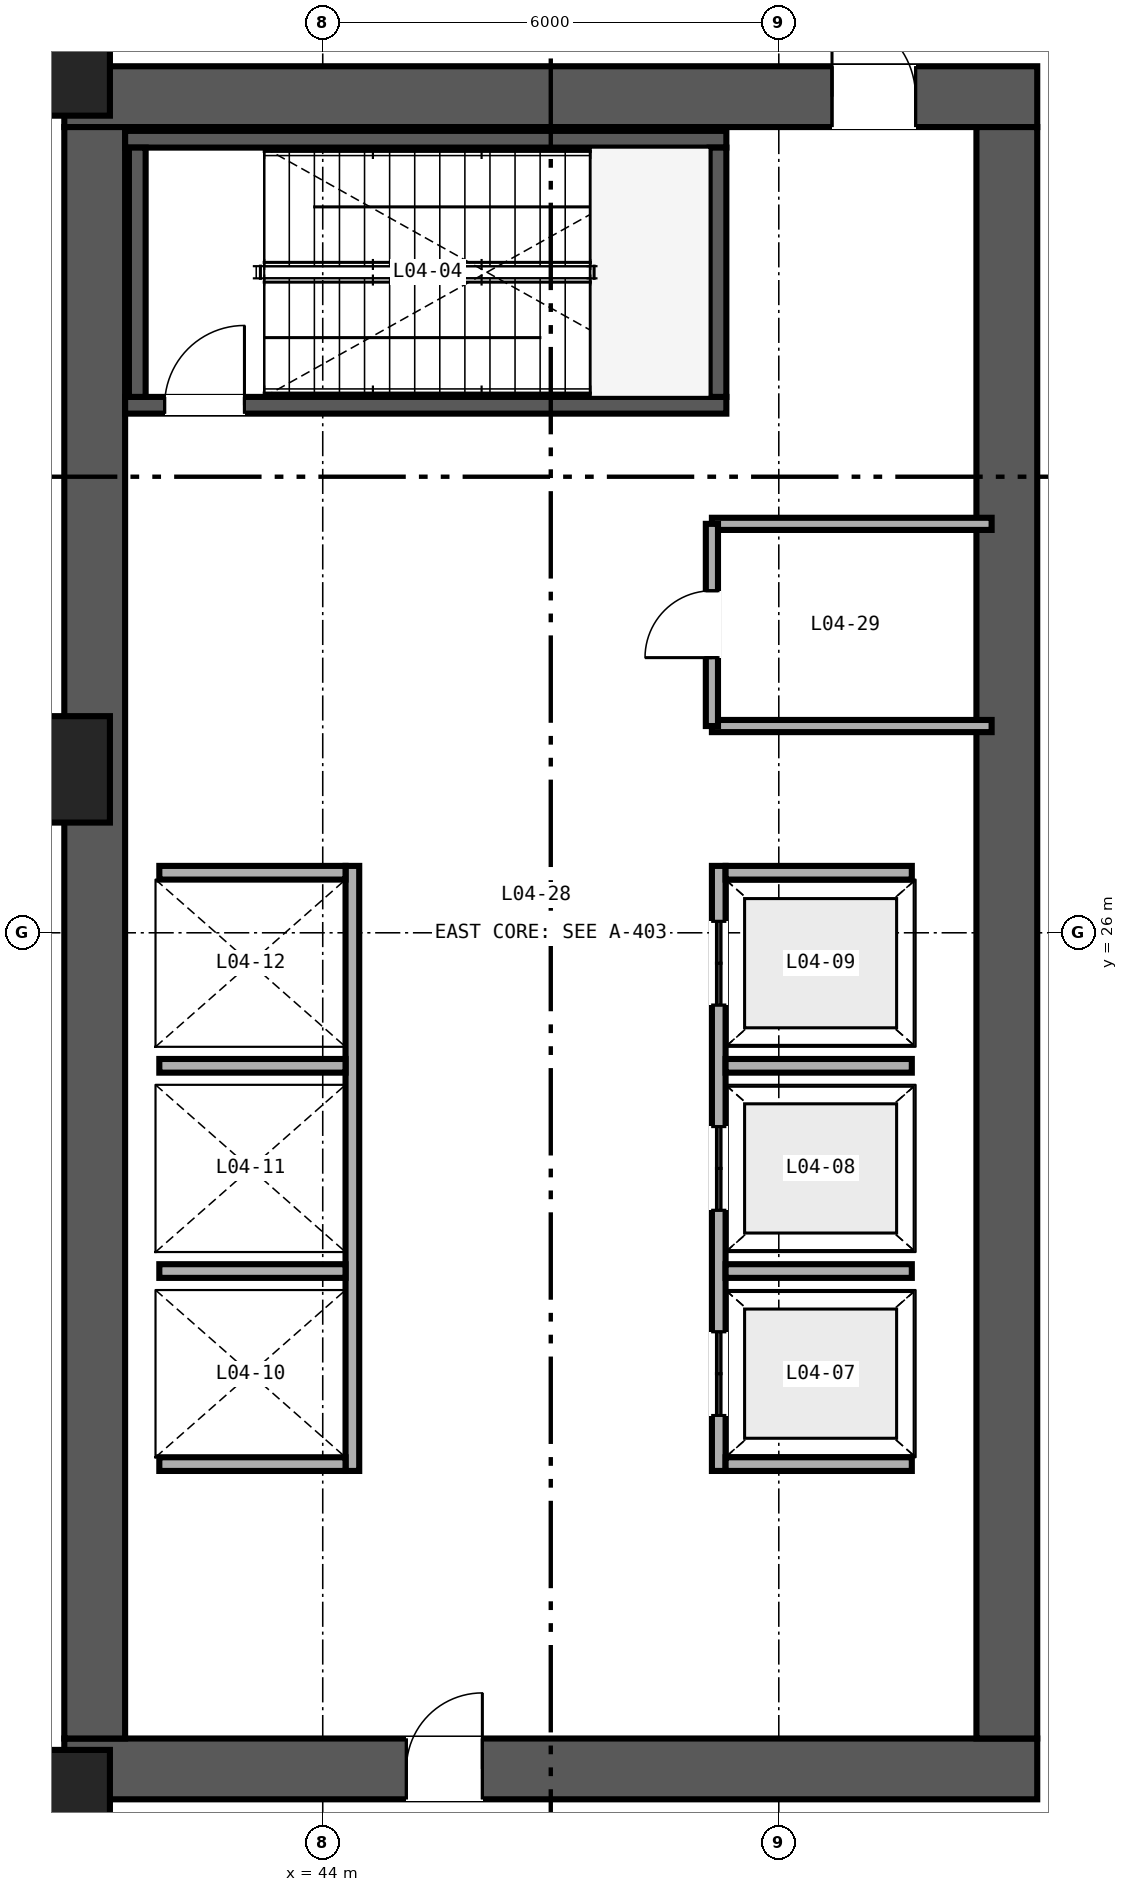
"""IFC4 building model, lengths in metres.
Left out: names, types, materials, properties, quantities, classifications, styles, units other than length and angle.
Written with IfcOpenShell. Run it as: python <this file> out.ifc"""

import sys

from ifc_helpers import new_model, si_unit, direction, frame, frame_2d, origin, origin_2d, place, context, subcontext, project, spatial, rectangle, extrude, source, transform, mapped, element, fill, save


model = new_model("IFC4")
c1 = context("Model", 3, precision=1e-05, world=origin(), true_north=direction((0.0, 1.0)))
c2 = subcontext(c1, "Body", "Model", "MODEL_VIEW")
j1 = project(units=[si_unit("LENGTHUNIT", "METRE"), si_unit("PLANEANGLEUNIT", "RADIAN")], contexts=[c1])
p1 = place(None, origin())
s1 = spatial("IfcSite", under=j1, at=p1, CompositionType="ELEMENT")
p2 = place(p1, origin())
s2 = spatial("IfcBuilding", under=s1, at=p2, CompositionType="ELEMENT")
p3 = place(p2, frame((0.0, 0.0, 19.2)))
s3 = spatial("IfcBuildingStorey", under=s2, at=p3, CompositionType="ELEMENT", Elevation=19.2)
p4 = place(p3, frame((40.6, 15.0, 0.0), z_axis=(0.0, 0.0, 1.0), x_axis=(1.0, 0.0, 0.0)))
e1 = element("IfcWall", 1, at=p4, inside=s3, PredefinedType="SHEAR", context=c2, shape_type="SweptSolid", body=[
    extrude(rectangle(XDim=12.8, YDim=0.8, at=frame_2d((6.4, 0.0))), origin(), (0.0, 0.0, 1.0), 4.48),
])
p5 = place(p4, frame((4.5, 0.0, 0.0)))
e2 = element("IfcOpeningElement", 2, at=p5, cuts=e1, PredefinedType="OPENING", context=c2, shape_type="SweptSolid", body=[
    extrude(rectangle(XDim=1.0, YDim=2.15, at=frame_2d((0.5, 1.075))), frame((0.0, 0.41, 0.0), z_axis=(0.0, -1.0, 0.0), x_axis=(1.0, 0.0, 0.0)), (0.0, 0.0, 1.0), 0.82),
])
p6 = place(p3, frame((40.6, 37.0, 0.0), z_axis=(0.0, 0.0, 1.0), x_axis=(1.0, 0.0, 0.0)))
e3 = element("IfcWall", 3, at=p6, inside=s3, PredefinedType="SHEAR", context=c2, shape_type="SweptSolid", body=[
    extrude(rectangle(XDim=12.8, YDim=0.8, at=frame_2d((6.4, 0.0))), origin(), (0.0, 0.0, 1.0), 4.48),
])
p7 = place(p6, frame((10.1, 0.0, 0.0)))
e4 = element("IfcOpeningElement", 4, at=p7, cuts=e3, PredefinedType="OPENING", context=c2, shape_type="SweptSolid", body=[
    extrude(rectangle(XDim=1.1, YDim=2.15, at=frame_2d((0.55, 1.075))), frame((0.0, 0.41, 0.0), z_axis=(0.0, -1.0, 0.0), x_axis=(1.0, 0.0, 0.0)), (0.0, 0.0, 1.0), 0.82),
])
for number, where, z_axis, x_axis in (
    (5, (41.0, 15.4, 0.0), (0.0, 0.0, 1.0), (0.0, 1.0, 0.0)),
    (6, (53.0, 15.4, 0.0), (0.0, 0.0, 1.0), (0.0, 1.0, 0.0)),
):
    element("IfcWall", number, at=place(p3, frame(where, z_axis=z_axis, x_axis=x_axis)), inside=s3, PredefinedType="SHEAR", context=c2, shape_type="SweptSolid", body=[
        extrude(rectangle(XDim=21.2, YDim=0.8, at=frame_2d((10.6, 0.0))), origin(), (0.0, 0.0, 1.0), 4.48),
    ])
p8 = place(p3, frame((41.4, 32.94, 0.0), z_axis=(0.0, 0.0, 1.0), x_axis=(1.0, 0.0, 0.0)))
e7 = element("IfcWall", 7, at=p8, inside=s3, PredefinedType="SHEAR", context=c2, shape_type="SweptSolid", body=[
    extrude(rectangle(XDim=7.91, YDim=0.22, at=frame_2d((3.955, 0.0))), origin(), (0.0, 0.0, 1.0), 4.6),
])
p9 = place(p8, frame((0.52, 0.0, 0.0)))
e8 = element("IfcOpeningElement", 8, at=p9, cuts=e7, PredefinedType="OPENING", context=c2, shape_type="SweptSolid", body=[
    extrude(rectangle(XDim=1.05, YDim=2.15, at=frame_2d((0.525, 1.075))), frame((0.0, 0.12, 0.0), z_axis=(0.0, -1.0, 0.0), x_axis=(1.0, 0.0, 0.0)), (0.0, 0.0, 1.0), 0.24),
])
p10 = place(p3, frame((41.4, 36.44, 0.0), z_axis=(0.0, 0.0, 1.0), x_axis=(1.0, 0.0, 0.0)))
e9 = element("IfcWall", 9, at=p10, inside=s3, PredefinedType="SHEAR", context=c2, shape_type="SweptSolid", body=[
    extrude(rectangle(XDim=7.91, YDim=0.22, at=frame_2d((3.955, 0.0))), origin(), (0.0, 0.0, 1.0), 4.6),
])
for number, where, z_axis, x_axis in (
    (10, (41.56, 33.05, 0.0), (0.0, 0.0, 1.0), (0.0, 1.0, 0.0)),
    (11, (49.2, 33.05, 0.0), (0.0, 0.0, 1.0), (0.0, 1.0, 0.0)),
):
    element("IfcWall", number, at=place(p3, frame(where, z_axis=z_axis, x_axis=x_axis)), inside=s3, PredefinedType="SHEAR", context=c2, shape_type="SweptSolid", body=[
        extrude(rectangle(XDim=3.28, YDim=0.22, at=frame_2d((1.64, 0.0))), origin(), (0.0, 0.0, 1.0), 4.6),
    ])
m1 = source(origin(), c2, "Body", "SweptSolid", [
    extrude(rectangle(XDim=1.4, YDim=1.4, at=origin_2d()), origin(), (0.0, 0.0, 1.0), 4.48),
])
for number, where, z_axis, x_axis in (
    (12, (40.5, 14.55, 0.0), (0.0, 0.0, 1.0), (1.0, 0.0, 0.0)),
    (13, (40.5, 28.15, 0.0), (0.0, 0.0, 1.0), (1.0, 0.0, 0.0)),
    (14, (40.5, 37.45, 0.0), (0.0, 0.0, 1.0), (1.0, 0.0, 0.0)),
):
    element("IfcColumn", number, at=place(p3, frame(where, z_axis=z_axis, x_axis=x_axis)), inside=s3, PredefinedType="COLUMN", context=c2, shape_type="MappedRepresentation", body=[
        mapped(m1, transform((0.0, 0.0, 0.0), scale=1.0)),
    ])
p11 = place(p3, frame((49.21, 18.92, 0.0), z_axis=(0.0, 0.0, 1.0), x_axis=(0.0, 1.0, 0.0)))
e15 = element("IfcWall", 15, at=p11, inside=s3, PredefinedType="SOLIDWALL", context=c2, shape_type="SweptSolid", body=[
    extrude(rectangle(XDim=7.96, YDim=0.18, at=frame_2d((3.98, 0.0))), origin(), (0.0, 0.0, 1.0), 4.48),
])
p12 = place(p11, frame((0.73, 0.0, 0.0)))
e16 = element("IfcOpeningElement", 16, at=p12, cuts=e15, PredefinedType="OPENING", context=c2, shape_type="SweptSolid", body=[
    extrude(rectangle(XDim=1.1, YDim=2.2, at=frame_2d((0.55, 1.1))), frame((0.0, 0.1, 0.0), z_axis=(0.0, -1.0, 0.0), x_axis=(1.0, 0.0, 0.0)), (0.0, 0.0, 1.0), 0.2),
])
p13 = place(p11, frame((3.43, 0.0, 0.0)))
e17 = element("IfcOpeningElement", 17, at=p13, cuts=e15, PredefinedType="OPENING", context=c2, shape_type="SweptSolid", body=[
    extrude(rectangle(XDim=1.1, YDim=2.2, at=frame_2d((0.55, 1.1))), frame((0.0, 0.1, 0.0), z_axis=(0.0, -1.0, 0.0), x_axis=(1.0, 0.0, 0.0)), (0.0, 0.0, 1.0), 0.2),
])
p14 = place(p11, frame((6.13, 0.0, 0.0)))
e18 = element("IfcOpeningElement", 18, at=p14, cuts=e15, PredefinedType="OPENING", context=c2, shape_type="SweptSolid", body=[
    extrude(rectangle(XDim=1.1, YDim=2.2, at=frame_2d((0.55, 1.1))), frame((0.0, 0.1, 0.0), z_axis=(0.0, -1.0, 0.0), x_axis=(1.0, 0.0, 0.0)), (0.0, 0.0, 1.0), 0.2),
])
for number, where, z_axis, x_axis in (
    (19, (49.3, 19.01, 0.0), (0.0, 0.0, 1.0), (1.0, 0.0, 0.0)),
    (20, (49.3, 26.79, 0.0), (0.0, 0.0, 1.0), (1.0, 0.0, 0.0)),
    (21, (49.3, 21.55, 0.0), (0.0, 0.0, 1.0), (1.0, 0.0, 0.0)),
    (22, (49.3, 24.25, 0.0), (0.0, 0.0, 1.0), (1.0, 0.0, 0.0)),
):
    element("IfcWall", number, at=place(p3, frame(where, z_axis=z_axis, x_axis=x_axis)), inside=s3, PredefinedType="SOLIDWALL", context=c2, shape_type="SweptSolid", body=[
        extrude(rectangle(XDim=2.45, YDim=0.18, at=frame_2d((1.225, 0.0))), origin(), (0.0, 0.0, 1.0), 4.48),
    ])
p15 = place(p3, frame((44.39, 18.92, 0.0), z_axis=(0.0, 0.0, 1.0), x_axis=(0.0, 1.0, 0.0)))
e23 = element("IfcWall", 23, at=p15, inside=s3, PredefinedType="SOLIDWALL", context=c2, shape_type="SweptSolid", body=[
    extrude(rectangle(XDim=7.96, YDim=0.18, at=frame_2d((3.98, 0.0))), origin(), (0.0, 0.0, 1.0), 4.48),
])
for number, where, z_axis, x_axis in (
    (24, (41.85, 19.01, 0.0), (0.0, 0.0, 1.0), (1.0, 0.0, 0.0)),
    (25, (41.85, 26.79, 0.0), (0.0, 0.0, 1.0), (1.0, 0.0, 0.0)),
    (26, (41.85, 21.55, 0.0), (0.0, 0.0, 1.0), (1.0, 0.0, 0.0)),
    (27, (41.85, 24.25, 0.0), (0.0, 0.0, 1.0), (1.0, 0.0, 0.0)),
):
    element("IfcWall", number, at=place(p3, frame(where, z_axis=z_axis, x_axis=x_axis)), inside=s3, PredefinedType="SOLIDWALL", context=c2, shape_type="SweptSolid", body=[
        extrude(rectangle(XDim=2.45, YDim=0.18, at=frame_2d((1.225, 0.0))), origin(), (0.0, 0.0, 1.0), 4.48),
    ])
p16 = place(p3, frame((49.12, 28.72, 0.0), z_axis=(0.0, 0.0, 1.0), x_axis=(1.0, 0.0, 0.0)))
e28 = element("IfcWall", 28, at=p16, inside=s3, PredefinedType="PARTITIONING", context=c2, shape_type="SweptSolid", body=[
    extrude(rectangle(XDim=3.68, YDim=0.16, at=frame_2d((1.84, 0.0))), origin(), (0.0, 0.0, 1.0), 4.48),
])
p17 = place(p3, frame((49.12, 31.38, 0.0), z_axis=(0.0, 0.0, 1.0), x_axis=(1.0, 0.0, 0.0)))
e29 = element("IfcWall", 29, at=p17, inside=s3, PredefinedType="PARTITIONING", context=c2, shape_type="SweptSolid", body=[
    extrude(rectangle(XDim=3.68, YDim=0.16, at=frame_2d((1.84, 0.0))), origin(), (0.0, 0.0, 1.0), 3.38),
])
p18 = place(p3, frame((49.12, 28.72, 0.0), z_axis=(0.0, 0.0, 1.0), x_axis=(0.0, 1.0, 0.0)))
e30 = element("IfcWall", 30, at=p18, inside=s3, PredefinedType="PARTITIONING", context=c2, shape_type="SweptSolid", body=[
    extrude(rectangle(XDim=2.66, YDim=0.16, at=frame_2d((1.33, 0.0))), origin(), (0.0, 0.0, 1.0), 3.38),
])
p19 = place(p18, frame((0.9, 0.0, 0.0)))
e31 = element("IfcOpeningElement", 31, at=p19, cuts=e30, PredefinedType="OPENING", context=c2, shape_type="SweptSolid", body=[
    extrude(rectangle(XDim=0.88, YDim=2.15, at=frame_2d((0.44, 1.075))), frame((0.0, 0.09, 0.0), z_axis=(0.0, -1.0, 0.0), x_axis=(1.0, 0.0, 0.0)), (0.0, 0.0, 1.0), 0.18),
])
m2 = source(origin(), c2, "Body", "SweptSolid", [
    extrude(rectangle(XDim=1.05, YDim=2.15, at=frame_2d((0.525, 1.075))), frame((0.0, 0.025, 0.0), z_axis=(0.0, -1.0, 0.0), x_axis=(1.0, 0.0, 0.0)), (0.0, 0.0, 1.0), 0.05),
])
p20 = place(p9, origin())
e32 = element("IfcDoor", 32, at=p20, inside=s3, OperationType="SINGLE_SWING_RIGHT", PredefinedType="DOOR", context=c2, shape_type="MappedRepresentation", body=[
    mapped(m2, transform((0.0, 0.0, 0.0), scale=1.0)),
])
fill(e8, e32)
m3 = source(origin(), c2, "Body", "SweptSolid", [
    extrude(rectangle(XDim=1.1, YDim=2.2, at=frame_2d((0.55, 1.1))), frame((0.0, 0.025, 0.0), z_axis=(0.0, -1.0, 0.0), x_axis=(1.0, 0.0, 0.0)), (0.0, 0.0, 1.0), 0.05),
])
p21 = place(p12, origin())
e33 = element("IfcDoor", 33, at=p21, inside=s3, OperationType="DOUBLE_DOOR_SLIDING", PredefinedType="DOOR", context=c2, shape_type="MappedRepresentation", body=[
    mapped(m3, transform((0.0, 0.0, 0.0), scale=1.0)),
])
fill(e16, e33)
p22 = place(p13, origin())
e34 = element("IfcDoor", 34, at=p22, inside=s3, OperationType="DOUBLE_DOOR_SLIDING", PredefinedType="DOOR", context=c2, shape_type="MappedRepresentation", body=[
    mapped(m3, transform((0.0, 0.0, 0.0), scale=1.0)),
])
fill(e17, e34)
p23 = place(p14, origin())
e35 = element("IfcDoor", 35, at=p23, inside=s3, OperationType="DOUBLE_DOOR_SLIDING", PredefinedType="DOOR", context=c2, shape_type="MappedRepresentation", body=[
    mapped(m3, transform((0.0, 0.0, 0.0), scale=1.0)),
])
fill(e18, e35)
m4 = source(origin(), c2, "Body", "SweptSolid", [
    extrude(rectangle(XDim=1.0, YDim=2.15, at=frame_2d((0.5, 1.075))), frame((0.0, 0.025, 0.0), z_axis=(0.0, -1.0, 0.0), x_axis=(1.0, 0.0, 0.0)), (0.0, 0.0, 1.0), 0.05),
])
p24 = place(p5, origin())
e36 = element("IfcDoor", 36, at=p24, inside=s3, OperationType="SINGLE_SWING_RIGHT", PredefinedType="DOOR", context=c2, shape_type="MappedRepresentation", body=[
    mapped(m4, transform((0.0, 0.0, 0.0), scale=1.0)),
])
fill(e2, e36)
m5 = source(origin(), c2, "Body", "SweptSolid", [
    extrude(rectangle(XDim=1.1, YDim=2.15, at=frame_2d((0.55, 1.075))), frame((0.0, 0.025, 0.0), z_axis=(0.0, -1.0, 0.0), x_axis=(1.0, 0.0, 0.0)), (0.0, 0.0, 1.0), 0.05),
])
p25 = place(p7, origin())
e37 = element("IfcDoor", 37, at=p25, inside=s3, OperationType="SINGLE_SWING_LEFT", PredefinedType="DOOR", context=c2, shape_type="MappedRepresentation", body=[
    mapped(m5, transform((0.0, 0.0, 0.0), scale=1.0)),
])
fill(e4, e37)
m6 = source(origin(), c2, "Body", "SweptSolid", [
    extrude(rectangle(XDim=0.88, YDim=2.15, at=frame_2d((0.44, 1.075))), frame((0.0, 0.025, 0.0), z_axis=(0.0, -1.0, 0.0), x_axis=(1.0, 0.0, 0.0)), (0.0, 0.0, 1.0), 0.05),
])
p26 = place(p19, origin())
e38 = element("IfcDoor", 38, at=p26, inside=s3, OperationType="SINGLE_SWING_LEFT", PredefinedType="DOOR", context=c2, shape_type="MappedRepresentation", body=[
    mapped(m6, transform((0.0, 0.0, 0.0), scale=1.0)),
])
fill(e31, e38)
save(model, sys.argv[1])
